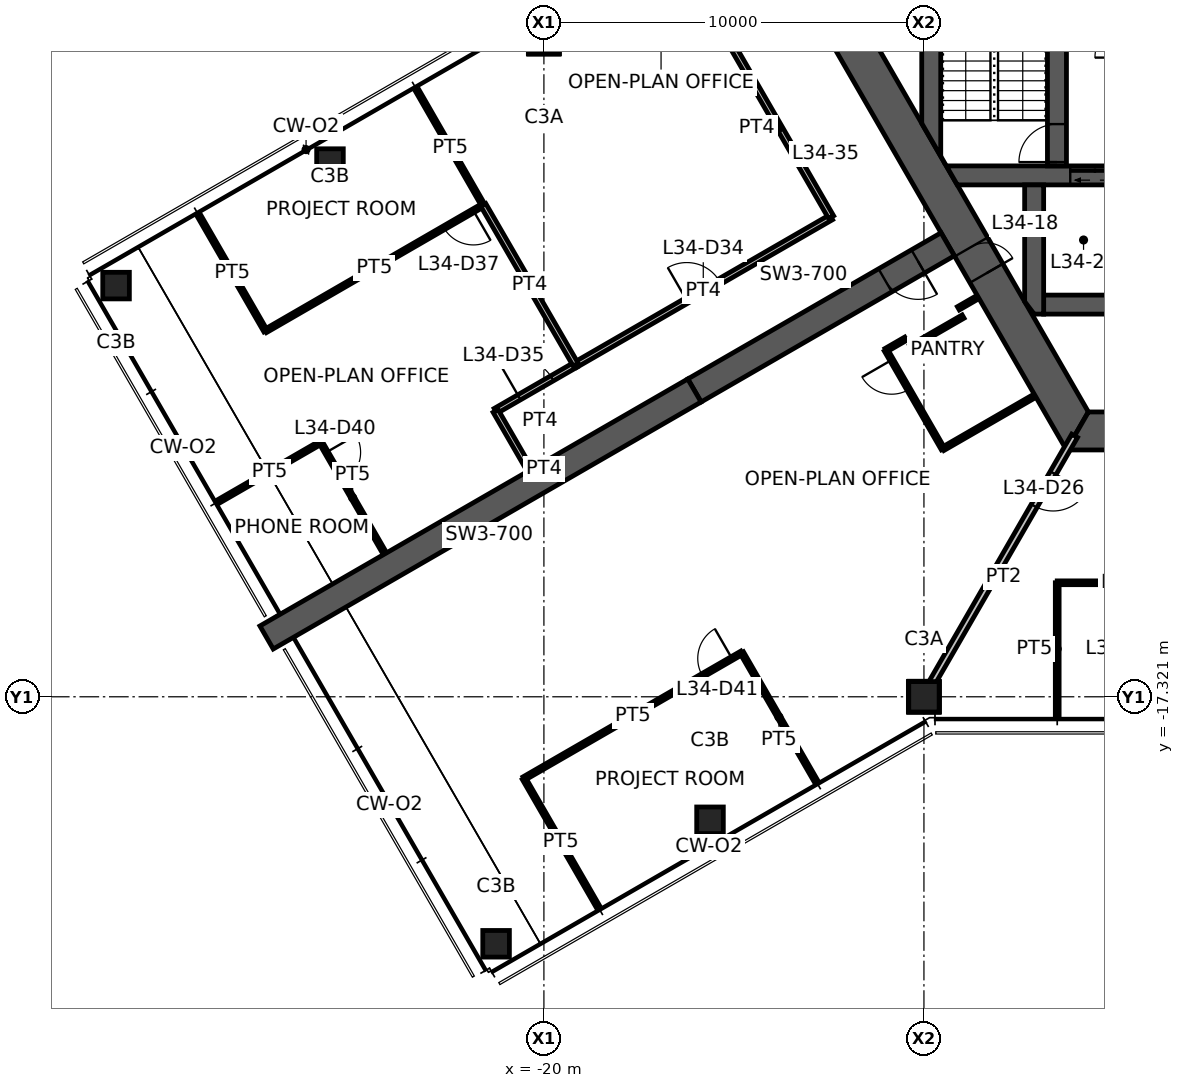
"""IFC4 building model, lengths in metres.
Left out: names, types, materials, properties, quantities, classifications, styles, units other than length and angle.
Written with IfcOpenShell. Run it as: python <this file> out.ifc"""

import sys

from ifc_helpers import new_model, si_unit, direction, frame, frame_2d, origin, origin_2d, place, context, subcontext, project, spatial, polyline, rectangle, hollow_rectangle, outline, extrude, element, fill, save


model = new_model("IFC4")
c1 = context("Model", 3, precision=1e-05, world=origin(), true_north=direction((0.0, 1.0)))
c2 = subcontext(c1, "Body", "Model", "MODEL_VIEW")
j1 = project(units=[si_unit("LENGTHUNIT", "METRE"), si_unit("PLANEANGLEUNIT", "RADIAN")], contexts=[c1])
p1 = place(None, origin())
s1 = spatial("IfcSite", under=j1, at=p1, CompositionType="ELEMENT")
p2 = place(p1, origin())
s2 = spatial("IfcBuilding", under=s1, at=p2, CompositionType="ELEMENT")
p3 = place(p2, frame((0.0, 0.0, 137.0)))
s3 = spatial("IfcBuildingStorey", under=s2, at=p3, CompositionType="ELEMENT", Elevation=137.0)
for number, where, z_axis, x_axis in (
    (1, (-20.0, 0.0, 0.0), (0.0, 0.0, 1.0), (1.0, 0.0, 0.0)),
    (2, (-10.0, -17.321, 0.0), (0.0, 0.0, 1.0), (1.0, 0.0, 0.0)),
):
    element("IfcColumn", number, at=place(p3, frame(where, z_axis=z_axis, x_axis=x_axis)), inside=s3, PredefinedType="COLUMN", context=c2, shape_type="SweptSolid", body=[
        extrude(hollow_rectangle(XDim=0.8, YDim=0.8, WallThickness=0.045, at=origin_2d()), origin(), (0.0, 0.0, 1.0), 3.9),
    ])
for number, where, z_axis, x_axis in (
    (3, (-25.629, -3.25, 0.0), (0.0, 0.0, 1.0), (1.0, 0.0, 0.0)),
    (4, (-31.258, -6.5, 0.0), (0.0, 0.0, 1.0), (1.0, 0.0, 0.0)),
    (5, (-15.629, -20.571, 0.0), (0.0, 0.0, 1.0), (1.0, 0.0, 0.0)),
    (6, (-21.258, -23.821, 0.0), (0.0, 0.0, 1.0), (1.0, 0.0, 0.0)),
):
    element("IfcColumn", number, at=place(p3, frame(where, z_axis=z_axis, x_axis=x_axis)), inside=s3, PredefinedType="COLUMN", context=c2, shape_type="SweptSolid", body=[
        extrude(hollow_rectangle(XDim=0.7, YDim=0.7, WallThickness=0.036, at=origin_2d()), origin(), (0.0, 0.0, 1.0), 3.9),
    ])
p4 = place(p3, frame((-11.922, 0.0, 0.0), z_axis=(0.0, 0.0, 1.0), x_axis=(0.500004296715, -0.866022923061, 0.0)))
e7 = element("IfcWall", 7, at=p4, inside=s3, PredefinedType="SHEAR", context=c2, shape_type="SweptSolid", body=[
    extrude(outline(polyline([(-0.289, -0.5), (6.331, -0.5), (7.131, -0.5), (12.211, -0.5), (11.634, 0.5), (7.131, 0.5), (6.331, 0.5), (0.289, 0.5), (-0.289, -0.5)])), origin(), (0.0, 0.0, 1.0), 3.9),
])
p5 = place(p4, frame((6.331, 0.0, 0.0)))
e8 = element("IfcOpeningElement", 8, at=p5, cuts=e7, PredefinedType="OPENING", context=c2, shape_type="SweptSolid", body=[
    extrude(rectangle(XDim=0.8, YDim=2.1, at=frame_2d((0.4, 1.05))), frame((0.0, 0.51, 0.0), z_axis=(0.0, -1.0, 0.0), x_axis=(1.0, 0.0, 0.0)), (0.0, 0.0, 1.0), 1.02),
])
p6 = place(p3, frame((-5.961, -10.325, 0.0), z_axis=(0.0, 0.0, 1.0), x_axis=(1.0, 0.0, 0.0)))
e9 = element("IfcWall", 9, at=p6, inside=s3, PredefinedType="SHEAR", context=c2, shape_type="SweptSolid", body=[
    extrude(outline(polyline([(-0.289, -0.5), (5.461, -0.5), (6.461, -0.5), (12.211, -0.5), (11.634, 0.5), (6.461, 0.5), (5.461, 0.5), (0.289, 0.5), (-0.289, -0.5)])), origin(), (0.0, 0.0, 1.0), 3.9),
])
p7 = place(p6, frame((5.461, 0.0, 0.0)))
e10 = element("IfcOpeningElement", 10, at=p7, cuts=e9, PredefinedType="OPENING", context=c2, shape_type="SweptSolid", body=[
    extrude(rectangle(XDim=1.0, YDim=2.1, at=frame_2d((0.5, 1.05))), frame((0.0, 0.51, 0.0), z_axis=(0.0, -1.0, 0.0), x_axis=(1.0, 0.0, 0.0)), (0.0, 0.0, 1.0), 1.02),
])
p8 = place(p3, frame((-9.375, -5.413, 0.0), z_axis=(0.0, 0.0, 1.0), x_axis=(-0.866032377459, -0.499987921047, 0.0)))
e11 = element("IfcWall", 11, at=p8, inside=s3, PredefinedType="SHEAR", context=c2, shape_type="SweptSolid", body=[
    extrude(rectangle(XDim=7.696, YDim=0.7, at=frame_2d((3.848, 0.0))), origin(), (0.0, 0.0, 1.0), 3.9),
])
p9 = place(p8, frame((0.9, 0.0, 0.0)))
e12 = element("IfcOpeningElement", 12, at=p9, cuts=e11, PredefinedType="OPENING", context=c2, shape_type="SweptSolid", body=[
    extrude(rectangle(XDim=1.0, YDim=2.1, at=frame_2d((0.5, 1.05))), frame((0.0, 0.36, 0.0), z_axis=(0.0, -1.0, 0.0), x_axis=(1.0, 0.0, 0.0)), (0.0, 0.0, 1.0), 0.72),
])
p10 = place(p3, frame((-16.039, -9.26, 0.0), z_axis=(0.0, 0.0, 1.0), x_axis=(-0.866024837091, -0.50000098154, 0.0)))
e13 = element("IfcWall", 13, at=p10, inside=s3, PredefinedType="SHEAR", context=c2, shape_type="SweptSolid", body=[
    extrude(rectangle(XDim=13.0, YDim=0.7, at=frame_2d((6.5, 0.0))), origin(), (0.0, 0.0, 1.0), 3.9),
])
p11 = place(p3, frame((-9.266, -3.6, 0.0), z_axis=(0.0, 0.0, 1.0), x_axis=(1.0, 0.0, 0.0)))
e14 = element("IfcWall", 14, at=p11, inside=s3, PredefinedType="SHEAR", context=c2, shape_type="SweptSolid", body=[
    extrude(outline(polyline([(0.144, -0.25), (3.116, -0.25), (4.417, -0.25), (5.667, -0.25), (6.767, -0.25), (7.916, -0.25), (7.916, 0.25), (6.767, 0.25), (5.667, 0.25), (4.417, 0.25), (3.116, 0.25), (-0.144, 0.25), (0.144, -0.25)])), origin(), (0.0, 0.0, 1.0), 3.9),
])
p12 = place(p11, frame((5.667, 0.0, 0.0)))
e15 = element("IfcOpeningElement", 15, at=p12, cuts=e14, PredefinedType="OPENING", context=c2, shape_type="SweptSolid", body=[
    extrude(rectangle(XDim=1.1, YDim=2.1, at=frame_2d((0.55, 1.05))), frame((0.0, 0.26, 0.0), z_axis=(0.0, -1.0, 0.0), x_axis=(1.0, 0.0, 0.0)), (0.0, 0.0, 1.0), 0.52),
])
p13 = place(p11, frame((3.116, 0.0, 0.0)))
e16 = element("IfcOpeningElement", 16, at=p13, cuts=e14, PredefinedType="OPENING", context=c2, shape_type="SweptSolid", body=[
    extrude(rectangle(XDim=1.3, YDim=2.1, at=frame_2d((0.65, 1.05))), frame((0.0, 0.26, 0.0), z_axis=(0.0, -1.0, 0.0), x_axis=(1.0, 0.0, 0.0)), (0.0, 0.0, 1.0), 0.52),
])
p14 = place(p3, frame((-6.5, -3.35, 0.0), z_axis=(0.0, 0.0, 1.0), x_axis=(0.0, 1.0, 0.0)))
e17 = element("IfcWall", 17, at=p14, inside=s3, PredefinedType="SHEAR", context=c2, shape_type="SweptSolid", body=[
    extrude(rectangle(XDim=6.7, YDim=0.5, at=frame_2d((3.35, 0.0))), origin(), (0.0, 0.0, 1.0), 3.9),
])
p15 = place(p14, frame((0.1, 0.0, 0.0)))
e18 = element("IfcOpeningElement", 18, at=p15, cuts=e17, PredefinedType="OPENING", context=c2, shape_type="SweptSolid", body=[
    extrude(rectangle(XDim=1.0, YDim=2.1, at=frame_2d((0.5, 1.05))), frame((0.0, 0.26, 0.0), z_axis=(0.0, -1.0, 0.0), x_axis=(1.0, 0.0, 0.0)), (0.0, 0.0, 1.0), 0.52),
])
p16 = place(p3, frame((-6.85, -7.0, 0.0), z_axis=(0.0, 0.0, 1.0), x_axis=(1.0, 0.0, 0.0)))
e19 = element("IfcWall", 19, at=p16, inside=s3, PredefinedType="SHEAR", context=c2, shape_type="SweptSolid", body=[
    extrude(rectangle(XDim=2.1, YDim=0.5, at=frame_2d((1.05, 0.0))), origin(), (0.0, 0.0, 1.0), 3.9),
])
p17 = place(p3, frame((-7.1, -3.85, 0.0), z_axis=(0.0, 0.0, 1.0), x_axis=(0.0, -1.0, 0.0)))
e20 = element("IfcWall", 20, at=p17, inside=s3, PredefinedType="SHEAR", context=c2, shape_type="SweptSolid", body=[
    extrude(outline(polyline([(0.0, -0.25), (3.069, -0.25), (3.4, 0.0), (3.4, 0.25), (0.0, 0.25), (0.0, -0.25)])), origin(), (0.0, 0.0, 1.0), 3.9),
])
p18 = place(p3, frame((-9.808, -2.662, 0.0), z_axis=(0.0, 0.0, 1.0), x_axis=(0.0, 1.0, 0.0)))
e21 = element("IfcWall", 21, at=p18, inside=s3, PredefinedType="SHEAR", context=c2, shape_type="SweptSolid", body=[
    extrude(outline(polyline([(-0.433, -0.25), (5.758, -0.25), (4.892, 0.25), (0.433, 0.25), (-0.433, -0.25)])), origin(), (0.0, 0.0, 1.0), 3.9),
])
p19 = place(p3, frame((-6.035, -10.453, 0.0), z_axis=(0.0, 0.0, 1.0), x_axis=(-0.499989830942, -0.866031274813, 0.0)))
e22 = element("IfcWall", 22, at=p19, inside=s3, PredefinedType="PARTITIONING", context=c2, shape_type="SweptSolid", body=[
    extrude(rectangle(XDim=7.93, YDim=0.175, at=frame_2d((3.965, 0.0))), origin(), (0.0, 0.0, 1.0), 3.05),
])
p20 = place(p19, frame((1.13, 0.0, 0.0)))
e23 = element("IfcOpeningElement", 23, at=p20, cuts=e22, PredefinedType="OPENING", context=c2, shape_type="SweptSolid", body=[
    extrude(rectangle(XDim=1.0, YDim=2.1, at=frame_2d((0.5, 1.05))), frame((0.0, 0.098, 0.0), z_axis=(0.0, -1.0, 0.0), x_axis=(1.0, 0.0, 0.0)), (0.0, 0.0, 1.0), 0.195),
])
p21 = place(p3, frame((-19.171, -8.586, 0.0), z_axis=(0.0, 0.0, 1.0), x_axis=(0.866007176269, 0.500031569654, 0.0)))
e24 = element("IfcWall", 24, at=p21, inside=s3, PredefinedType="PARTITIONING", context=c2, shape_type="SweptSolid", body=[
    extrude(rectangle(XDim=7.771, YDim=0.15, at=frame_2d((3.885, 0.0))), origin(), (0.0, 0.0, 1.0), 2.95),
])
p22 = place(p21, frame((3.385, 0.0, 0.0)))
e25 = element("IfcOpeningElement", 25, at=p22, cuts=e24, PredefinedType="OPENING", context=c2, shape_type="SweptSolid", body=[
    extrude(rectangle(XDim=1.0, YDim=2.1, at=frame_2d((0.5, 1.05))), frame((0.0, 0.085, 0.0), z_axis=(0.0, -1.0, 0.0), x_axis=(1.0, 0.0, 0.0)), (0.0, 0.0, 1.0), 0.17),
])
p23 = place(p3, frame((-12.442, -4.7, 0.0), z_axis=(0.0, 0.0, 1.0), x_axis=(-0.500009286329, 0.866020042254, 0.0)))
e26 = element("IfcWall", 26, at=p23, inside=s3, PredefinedType="PARTITIONING", context=c2, shape_type="SweptSolid", body=[
    extrude(rectangle(XDim=5.428, YDim=0.15, at=frame_2d((2.714, 0.0))), origin(), (0.0, 0.0, 1.0), 2.95),
])
p24 = place(p3, frame((-21.271, -9.798, 0.0), z_axis=(0.0, 0.0, 1.0), x_axis=(0.866025270247, 0.500000231294, 0.0)))
e27 = element("IfcWall", 27, at=p24, inside=s3, PredefinedType="PARTITIONING", context=c2, shape_type="SweptSolid", body=[
    extrude(rectangle(XDim=2.435, YDim=0.15, at=frame_2d((1.217, 0.0))), origin(), (0.0, 0.0, 1.0), 2.95),
])
p25 = place(p24, frame((0.717, 0.0, 0.0)))
e28 = element("IfcOpeningElement", 28, at=p25, cuts=e27, PredefinedType="OPENING", context=c2, shape_type="SweptSolid", body=[
    extrude(rectangle(XDim=1.0, YDim=2.1, at=frame_2d((0.5, 1.05))), frame((0.0, 0.085, 0.0), z_axis=(0.0, -1.0, 0.0), x_axis=(1.0, 0.0, 0.0)), (0.0, 0.0, 1.0), 0.17),
])
p26 = place(p3, frame((-20.381, -11.34, 0.0), z_axis=(0.0, 0.0, 1.0), x_axis=(-0.500062787734, 0.865989150234, 0.0)))
e29 = element("IfcWall", 29, at=p26, inside=s3, PredefinedType="PARTITIONING", context=c2, shape_type="SweptSolid", body=[
    extrude(rectangle(XDim=1.78, YDim=0.15, at=frame_2d((0.89, 0.0))), origin(), (0.0, 0.0, 1.0), 2.95),
])
p27 = place(p3, frame((-23.332, -1.37, 0.0), z_axis=(0.0, 0.0, 1.0), x_axis=(0.498863855434, -0.86668036423, 0.0)))
e30 = element("IfcWall", 30, at=p27, inside=s3, PredefinedType="PARTITIONING", context=c2, shape_type="SweptSolid", body=[
    extrude(rectangle(XDim=3.48, YDim=0.1, at=frame_2d((1.74, 0.0))), origin(), (0.0, 0.0, 1.0), 2.95),
])
p28 = place(p3, frame((-27.325, -7.693, 0.0), z_axis=(0.0, 0.0, 1.0), x_axis=(-0.499989765943, 0.866031312339, 0.0)))
e31 = element("IfcWall", 31, at=p28, inside=s3, PredefinedType="PARTITIONING", context=c2, shape_type="SweptSolid", body=[
    extrude(rectangle(XDim=3.505, YDim=0.1, at=frame_2d((1.752, 0.0))), origin(), (0.0, 0.0, 1.0), 2.95),
])
p29 = place(p3, frame((-21.594, -4.379, 0.0), z_axis=(0.0, 0.0, 1.0), x_axis=(-0.865682888643, -0.500592784916, 0.0)))
e32 = element("IfcWall", 32, at=p29, inside=s3, PredefinedType="PARTITIONING", context=c2, shape_type="SweptSolid", body=[
    extrude(rectangle(XDim=6.62, YDim=0.1, at=frame_2d((3.31, 0.0))), origin(), (0.0, 0.0, 1.0), 2.95),
])
p30 = place(p29, frame((0.3, 0.0, 0.0)))
e33 = element("IfcOpeningElement", 33, at=p30, cuts=e32, PredefinedType="OPENING", context=c2, shape_type="SweptSolid", body=[
    extrude(rectangle(XDim=0.9, YDim=2.1, at=frame_2d((0.45, 1.05))), frame((0.0, 0.06, 0.0), z_axis=(0.0, -1.0, 0.0), x_axis=(1.0, 0.0, 0.0)), (0.0, 0.0, 1.0), 0.12),
])
p31 = place(p3, frame((-28.562, -12.18, 0.0), z_axis=(0.0, 0.0, 1.0), x_axis=(0.866042875753, 0.499969736442, 0.0)))
e34 = element("IfcWall", 34, at=p31, inside=s3, PredefinedType="PARTITIONING", context=c2, shape_type="SweptSolid", body=[
    extrude(rectangle(XDim=3.105, YDim=0.1, at=frame_2d((1.553, 0.0))), origin(), (0.0, 0.0, 1.0), 2.95),
])
p32 = place(p3, frame((-25.873, -10.627, 0.0), z_axis=(0.0, 0.0, 1.0), x_axis=(0.5000115033, -0.866018762249, 0.0)))
e35 = element("IfcWall", 35, at=p32, inside=s3, PredefinedType="PARTITIONING", context=c2, shape_type="SweptSolid", body=[
    extrude(rectangle(XDim=3.363, YDim=0.1, at=frame_2d((1.682, 0.0))), origin(), (0.0, 0.0, 1.0), 2.95),
])
p33 = place(p32, frame((0.3, 0.0, 0.0)))
e36 = element("IfcOpeningElement", 36, at=p33, cuts=e35, PredefinedType="OPENING", context=c2, shape_type="SweptSolid", body=[
    extrude(rectangle(XDim=0.9, YDim=2.1, at=frame_2d((0.45, 1.05))), frame((0.0, 0.06, 0.0), z_axis=(0.0, -1.0, 0.0), x_axis=(1.0, 0.0, 0.0)), (0.0, 0.0, 1.0), 0.12),
])
p34 = place(p3, frame((-19.163, -8.581, 0.0), z_axis=(0.0, 0.0, 1.0), x_axis=(-0.500843945189, 0.865537603209, 0.0)))
e37 = element("IfcWall", 37, at=p34, inside=s3, PredefinedType="PARTITIONING", context=c2, shape_type="SweptSolid", body=[
    extrude(rectangle(XDim=4.854, YDim=0.15, at=frame_2d((2.427, 0.0))), origin(), (0.0, 0.0, 1.0), 2.95),
])
p35 = place(p3, frame((-20.525, -19.471, 0.0), z_axis=(0.0, 0.0, 1.0), x_axis=(0.866021597574, 0.500006592492, 0.0)))
e38 = element("IfcWall", 38, at=p35, inside=s3, PredefinedType="PARTITIONING", context=c2, shape_type="SweptSolid", body=[
    extrude(rectangle(XDim=6.62, YDim=0.1, at=frame_2d((3.31, 0.0))), origin(), (0.0, 0.0, 1.0), 2.95),
])
p36 = place(p35, frame((5.42, 0.0, 0.0)))
e39 = element("IfcOpeningElement", 39, at=p36, cuts=e38, PredefinedType="OPENING", context=c2, shape_type="SweptSolid", body=[
    extrude(rectangle(XDim=0.9, YDim=2.1, at=frame_2d((0.45, 1.05))), frame((0.0, 0.06, 0.0), z_axis=(0.0, -1.0, 0.0), x_axis=(1.0, 0.0, 0.0)), (0.0, 0.0, 1.0), 0.12),
])
p37 = place(p3, frame((-18.585, -22.831, 0.0), z_axis=(0.0, 0.0, 1.0), x_axis=(-0.499996613652, 0.866027358884, 0.0)))
e40 = element("IfcWall", 40, at=p37, inside=s3, PredefinedType="PARTITIONING", context=c2, shape_type="SweptSolid", body=[
    extrude(rectangle(XDim=3.88, YDim=0.1, at=frame_2d((1.94, 0.0))), origin(), (0.0, 0.0, 1.0), 2.95),
])
p38 = place(p3, frame((-14.792, -16.161, 0.0), z_axis=(0.0, 0.0, 1.0), x_axis=(0.500025510799, -0.866010674617, 0.0)))
e41 = element("IfcWall", 41, at=p38, inside=s3, PredefinedType="PARTITIONING", context=c2, shape_type="SweptSolid", body=[
    extrude(rectangle(XDim=3.905, YDim=0.1, at=frame_2d((1.953, 0.0))), origin(), (0.0, 0.0, 1.0), 2.95),
])
p39 = place(p3, frame((-11.0, -8.198, 0.0), z_axis=(0.0, 0.0, 1.0), x_axis=(0.866131372301, 0.499816412211, 0.0)))
e42 = element("IfcWall", 42, at=p39, inside=s3, PredefinedType="PARTITIONING", context=c2, shape_type="SweptSolid", body=[
    extrude(rectangle(XDim=0.6, YDim=0.1, at=frame_2d((0.3, 0.0))), origin(), (0.0, 0.0, 1.0), 2.95),
])
p40 = place(p3, frame((-10.355, -8.115, 0.0), z_axis=(0.0, 0.0, 1.0), x_axis=(0.866094119867, 0.499880961361, 0.0)))
e43 = element("IfcWall", 43, at=p40, inside=s3, PredefinedType="PARTITIONING", context=c2, shape_type="SweptSolid", body=[
    extrude(rectangle(XDim=1.6, YDim=0.1, at=frame_2d((0.8, 0.0))), origin(), (0.0, 0.0, 1.0), 2.95),
])
p41 = place(p3, frame((-9.5, -10.796, 0.0), z_axis=(0.0, 0.0, 1.0), x_axis=(-0.499990139034, 0.866031096941, 0.0)))
e44 = element("IfcWall", 44, at=p41, inside=s3, PredefinedType="PARTITIONING", context=c2, shape_type="SweptSolid", body=[
    extrude(rectangle(XDim=3.0, YDim=0.1, at=frame_2d((1.5, 0.0))), origin(), (0.0, 0.0, 1.0), 2.95),
])
p42 = place(p41, frame((1.8, 0.0, 0.0)))
e45 = element("IfcOpeningElement", 45, at=p42, cuts=e44, PredefinedType="OPENING", context=c2, shape_type="SweptSolid", body=[
    extrude(rectangle(XDim=0.9, YDim=2.1, at=frame_2d((0.45, 1.05))), frame((0.0, 0.06, 0.0), z_axis=(0.0, -1.0, 0.0), x_axis=(1.0, 0.0, 0.0)), (0.0, 0.0, 1.0), 0.12),
])
p43 = place(p3, frame((-9.094, -7.098, 0.0), z_axis=(0.0, 0.0, 1.0), x_axis=(0.865954211699, 0.50012328804, 0.0)))
e46 = element("IfcWall", 46, at=p43, inside=s3, PredefinedType="PARTITIONING", context=c2, shape_type="SweptSolid", body=[
    extrude(rectangle(XDim=0.58, YDim=0.1, at=frame_2d((0.29, 0.0))), origin(), (0.0, 0.0, 1.0), 2.95),
])
p44 = place(p3, frame((-7.092, -9.406, 0.0), z_axis=(0.0, 0.0, 1.0), x_axis=(-0.86603494908, -0.499983466698, 0.0)))
e47 = element("IfcWall", 47, at=p44, inside=s3, PredefinedType="PARTITIONING", context=c2, shape_type="SweptSolid", body=[
    extrude(rectangle(XDim=2.78, YDim=0.1, at=frame_2d((1.39, 0.0))), origin(), (0.0, 0.0, 1.0), 2.95),
])
p45 = place(p3, frame((-6.493, -17.801, 0.0), z_axis=(0.0, 0.0, 1.0), x_axis=(0.0, 1.0, 0.0)))
e48 = element("IfcWall", 48, at=p45, inside=s3, PredefinedType="PARTITIONING", context=c2, shape_type="SweptSolid", body=[
    extrude(rectangle(XDim=3.48, YDim=0.1, at=frame_2d((1.74, 0.0))), origin(), (0.0, 0.0, 1.0), 2.95),
])
p46 = place(p3, frame((-6.493, -14.321, 0.0), z_axis=(0.0, 0.0, 1.0), x_axis=(1.0, 0.0, 0.0)))
e49 = element("IfcWall", 49, at=p46, inside=s3, PredefinedType="PARTITIONING", context=c2, shape_type="SweptSolid", body=[
    extrude(rectangle(XDim=3.247, YDim=0.1, at=frame_2d((1.623, 0.0))), origin(), (0.0, 0.0, 1.0), 2.95),
])
p47 = place(p5, origin())
e50 = element("IfcDoor", 50, at=p47, inside=s3, OperationType="SINGLE_SWING_RIGHT", PredefinedType="DOOR", context=c2, shape_type="SweptSolid", body=[
    extrude(rectangle(XDim=0.8, YDim=2.1, at=frame_2d((0.4, 1.05))), frame((0.0, 0.025, 0.0), z_axis=(0.0, -1.0, 0.0), x_axis=(1.0, 0.0, 0.0)), (0.0, 0.0, 1.0), 0.05),
])
fill(e8, e50)
p48 = place(p15, origin())
e51 = element("IfcDoor", 51, at=p48, inside=s3, OperationType="SINGLE_SWING_LEFT", PredefinedType="DOOR", context=c2, shape_type="SweptSolid", body=[
    extrude(rectangle(XDim=1.0, YDim=2.1, at=frame_2d((0.5, 1.05))), frame((0.0, 0.025, 0.0), z_axis=(0.0, -1.0, 0.0), x_axis=(1.0, 0.0, 0.0)), (0.0, 0.0, 1.0), 0.05),
])
fill(e18, e51)
p49 = place(p9, origin())
e52 = element("IfcDoor", 52, at=p49, inside=s3, OperationType="SINGLE_SWING_LEFT", PredefinedType="DOOR", context=c2, shape_type="SweptSolid", body=[
    extrude(rectangle(XDim=1.0, YDim=2.1, at=frame_2d((0.5, 1.05))), frame((0.0, 0.025, 0.0), z_axis=(0.0, -1.0, 0.0), x_axis=(1.0, 0.0, 0.0)), (0.0, 0.0, 1.0), 0.05),
])
fill(e12, e52)
p50 = place(p20, origin())
e53 = element("IfcDoor", 53, at=p50, inside=s3, OperationType="SINGLE_SWING_LEFT", PredefinedType="DOOR", context=c2, shape_type="SweptSolid", body=[
    extrude(rectangle(XDim=1.0, YDim=2.1, at=frame_2d((0.5, 1.05))), frame((0.0, 0.025, 0.0), z_axis=(0.0, -1.0, 0.0), x_axis=(1.0, 0.0, 0.0)), (0.0, 0.0, 1.0), 0.05),
])
fill(e23, e53)
p51 = place(p22, origin())
e54 = element("IfcDoor", 54, at=p51, inside=s3, OperationType="SINGLE_SWING_LEFT", PredefinedType="DOOR", context=c2, shape_type="SweptSolid", body=[
    extrude(rectangle(XDim=1.0, YDim=2.1, at=frame_2d((0.5, 1.05))), frame((0.0, 0.025, 0.0), z_axis=(0.0, -1.0, 0.0), x_axis=(1.0, 0.0, 0.0)), (0.0, 0.0, 1.0), 0.05),
])
fill(e25, e54)
p52 = place(p25, origin())
e55 = element("IfcDoor", 55, at=p52, inside=s3, OperationType="SINGLE_SWING_LEFT", PredefinedType="DOOR", context=c2, shape_type="SweptSolid", body=[
    extrude(rectangle(XDim=1.0, YDim=2.1, at=frame_2d((0.5, 1.05))), frame((0.0, 0.025, 0.0), z_axis=(0.0, -1.0, 0.0), x_axis=(1.0, 0.0, 0.0)), (0.0, 0.0, 1.0), 0.05),
])
fill(e28, e55)
p53 = place(p30, origin())
e56 = element("IfcDoor", 56, at=p53, inside=s3, OperationType="SINGLE_SWING_LEFT", PredefinedType="DOOR", context=c2, shape_type="SweptSolid", body=[
    extrude(rectangle(XDim=0.9, YDim=2.1, at=frame_2d((0.45, 1.05))), frame((0.0, 0.025, 0.0), z_axis=(0.0, -1.0, 0.0), x_axis=(1.0, 0.0, 0.0)), (0.0, 0.0, 1.0), 0.05),
])
fill(e33, e56)
p54 = place(p33, origin())
e57 = element("IfcDoor", 57, at=p54, inside=s3, OperationType="SINGLE_SWING_LEFT", PredefinedType="DOOR", context=c2, shape_type="SweptSolid", body=[
    extrude(rectangle(XDim=0.9, YDim=2.1, at=frame_2d((0.45, 1.05))), frame((0.0, 0.025, 0.0), z_axis=(0.0, -1.0, 0.0), x_axis=(1.0, 0.0, 0.0)), (0.0, 0.0, 1.0), 0.05),
])
fill(e36, e57)
p55 = place(p36, origin())
e58 = element("IfcDoor", 58, at=p55, inside=s3, OperationType="SINGLE_SWING_RIGHT", PredefinedType="DOOR", context=c2, shape_type="SweptSolid", body=[
    extrude(rectangle(XDim=0.9, YDim=2.1, at=frame_2d((0.45, 1.05))), frame((0.0, 0.025, 0.0), z_axis=(0.0, -1.0, 0.0), x_axis=(1.0, 0.0, 0.0)), (0.0, 0.0, 1.0), 0.05),
])
fill(e39, e58)
p56 = place(p42, origin())
e59 = element("IfcDoor", 59, at=p56, inside=s3, OperationType="SINGLE_SWING_RIGHT", PredefinedType="DOOR", context=c2, shape_type="SweptSolid", body=[
    extrude(rectangle(XDim=0.9, YDim=2.1, at=frame_2d((0.45, 1.05))), frame((0.0, 0.025, 0.0), z_axis=(0.0, -1.0, 0.0), x_axis=(1.0, 0.0, 0.0)), (0.0, 0.0, 1.0), 0.05),
])
fill(e45, e59)
p57 = place(p13, origin())
e60 = element("IfcDoor", 60, at=p57, inside=s3, OperationType="DOUBLE_DOOR_SLIDING", PredefinedType="DOOR", context=c2, shape_type="SweptSolid", body=[
    extrude(rectangle(XDim=1.3, YDim=2.1, at=frame_2d((0.65, 1.05))), frame((0.0, 0.025, 0.0), z_axis=(0.0, -1.0, 0.0), x_axis=(1.0, 0.0, 0.0)), (0.0, 0.0, 1.0), 0.05),
])
fill(e16, e60)
save(model, sys.argv[1])
